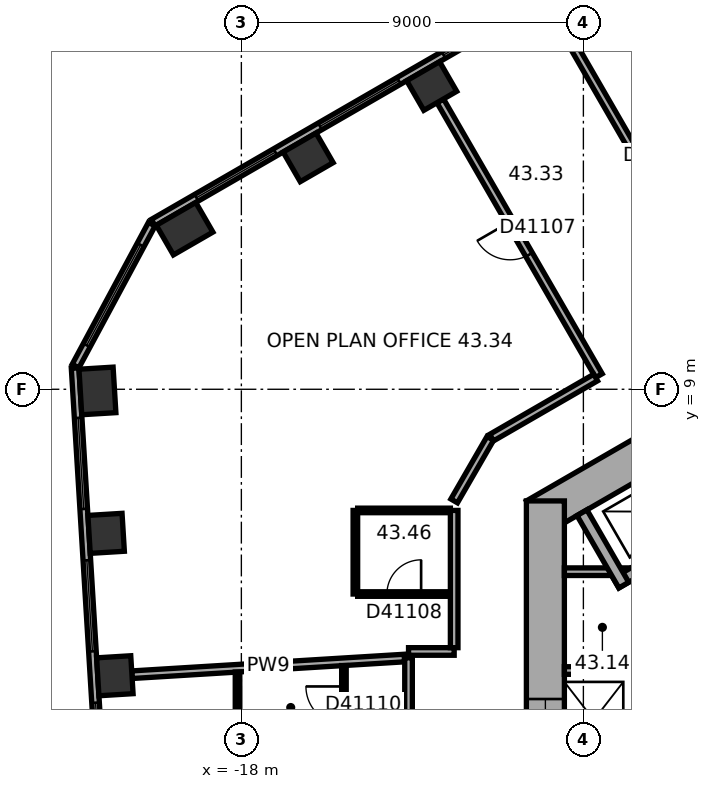
"""IFC4 building model, lengths in metres.
Left out: names, types, materials, properties, quantities, classifications, styles, units other than length and angle.
Written with IfcOpenShell. Run it as: python <this file> out.ifc"""

import sys

from ifc_helpers import new_model, si_unit, direction, frame, frame_2d, origin, origin_2d, place, context, subcontext, project, spatial, rectangle, extrude, element, fill, save


model = new_model("IFC4")
c1 = context("Model", 3, precision=1e-05, world=origin(), true_north=direction((0.0, 1.0)))
c2 = subcontext(c1, "Body", "Model", "MODEL_VIEW")
j1 = project(units=[si_unit("LENGTHUNIT", "METRE"), si_unit("PLANEANGLEUNIT", "RADIAN")], contexts=[c1])
p1 = place(None, origin())
s1 = spatial("IfcSite", under=j1, at=p1, CompositionType="ELEMENT")
p2 = place(p1, origin())
s2 = spatial("IfcBuilding", under=s1, at=p2, CompositionType="ELEMENT")
p3 = place(p2, frame((0.0, 0.0, 176.2)))
s3 = spatial("IfcBuildingStorey", under=s2, at=p3, CompositionType="ELEMENT", Elevation=176.2)
for number, where, z_axis, x_axis in (
    (1, (-12.991, 16.979, 0.0), (0.0, 0.0, 1.0), (-0.866, -0.5, 0.0)),
    (2, (-16.242, 15.102, 0.0), (0.0, 0.0, 1.0), (-0.866, -0.5, 0.0)),
):
    element("IfcColumn", number, at=place(p3, frame(where, z_axis=z_axis, x_axis=x_axis)), inside=s3, PredefinedType="COLUMN", context=c2, shape_type="SweptSolid", body=[
        extrude(rectangle(XDim=1.0, YDim=0.9, at=origin_2d()), origin(), (0.0, 0.0, 1.0), 3.7),
    ])
for number, where, z_axis, x_axis in (
    (3, (-19.494, 13.225, 0.0), (0.0, 0.0, 1.0), (-0.866, -0.5, 0.0)),
    (4, (-21.787, 8.956, 0.0), (0.0, 0.0, 1.0), (0.061, -0.998, 0.0)),
):
    element("IfcColumn", number, at=place(p3, frame(where, z_axis=z_axis, x_axis=x_axis)), inside=s3, PredefinedType="COLUMN", context=c2, shape_type="SweptSolid", body=[
        extrude(rectangle(XDim=1.2, YDim=0.9, at=origin_2d()), origin(), (0.0, 0.0, 1.0), 3.7),
    ])
for number, where, z_axis, x_axis in (
    (5, (-21.558, 5.209, 0.0), (0.0, 0.0, 1.0), (0.061, -0.998, 0.0)),
    (6, (-21.329, 1.462, 0.0), (0.0, 0.0, 1.0), (0.061, -0.998, 0.0)),
):
    element("IfcColumn", number, at=place(p3, frame(where, z_axis=z_axis, x_axis=x_axis)), inside=s3, PredefinedType="COLUMN", context=c2, shape_type="SweptSolid", body=[
        extrude(rectangle(XDim=1.0, YDim=0.9, at=origin_2d()), origin(), (0.0, 0.0, 1.0), 3.7),
    ])
p4 = place(p3, frame((0.25, 11.691, 0.0), z_axis=(0.0, 0.0, 1.0), x_axis=(-0.866022616891, -0.50000482701, 0.0)))
e7 = element("IfcWall", 7, at=p4, inside=s3, PredefinedType="SHEAR", context=c2, shape_type="SweptSolid", body=[
    extrude(rectangle(XDim=12.125, YDim=1.0, at=frame_2d((6.062, 0.0))), origin(), (0.0, 0.0, 1.0), 3.7),
])
p5 = place(p4, frame((6.262, 0.0, 0.0)))
e8 = element("IfcOpeningElement", 8, at=p5, cuts=e7, PredefinedType="OPENING", context=c2, shape_type="SweptSolid", body=[
    extrude(rectangle(XDim=1.5, YDim=2.1, at=frame_2d((0.75, 1.05))), frame((0.0, 0.51, 0.0), z_axis=(0.0, -1.0, 0.0), x_axis=(1.0, 0.0, 0.0)), (0.0, 0.0, 1.0), 1.02),
])
p6 = place(p4, frame((3.112, 0.0, 0.0)))
e9 = element("IfcOpeningElement", 9, at=p6, cuts=e7, PredefinedType="OPENING", context=c2, shape_type="SweptSolid", body=[
    extrude(rectangle(XDim=0.9, YDim=2.1, at=frame_2d((0.45, 1.05))), frame((0.0, 0.51, 0.0), z_axis=(0.0, -1.0, 0.0), x_axis=(1.0, 0.0, 0.0)), (0.0, 0.0, 1.0), 1.02),
])
p7 = place(p3, frame((-10.0, 6.062, 0.0), z_axis=(0.0, 0.0, 1.0), x_axis=(0.0, -1.0, 0.0)))
e10 = element("IfcWall", 10, at=p7, inside=s3, PredefinedType="SHEAR", context=c2, shape_type="SweptSolid", body=[
    extrude(rectangle(XDim=12.125, YDim=1.0, at=frame_2d((6.062, 0.0))), origin(), (0.0, 0.0, 1.0), 3.7),
])
p8 = place(p7, frame((5.212, 0.0, 0.0)))
e11 = element("IfcOpeningElement", 11, at=p8, cuts=e10, PredefinedType="OPENING", context=c2, shape_type="SweptSolid", body=[
    extrude(rectangle(XDim=1.1, YDim=2.1, at=frame_2d((0.55, 1.05))), frame((0.0, 0.51, 0.0), z_axis=(0.0, -1.0, 0.0), x_axis=(1.0, 0.0, 0.0)), (0.0, 0.0, 1.0), 1.02),
])
p9 = place(p7, frame((7.812, 0.0, 0.0)))
e12 = element("IfcOpeningElement", 12, at=p9, cuts=e10, PredefinedType="OPENING", context=c2, shape_type="SweptSolid", body=[
    extrude(rectangle(XDim=1.1, YDim=2.1, at=frame_2d((0.55, 1.05))), frame((0.0, 0.51, 0.0), z_axis=(0.0, -1.0, 0.0), x_axis=(1.0, 0.0, 0.0)), (0.0, 0.0, 1.0), 1.02),
])
p10 = place(p3, frame((-2.961, 23.405, 0.0), z_axis=(0.0, 0.0, 1.0), x_axis=(-0.866023315909, -0.500003616288, 0.0)))
e13 = element("IfcWall", 13, at=p10, inside=s3, PredefinedType="STANDARD", context=c2, shape_type="SweptSolid", body=[
    extrude(rectangle(XDim=20.044, YDim=0.2, at=frame_2d((10.022, 0.0))), origin(), (0.0, 0.0, 1.0), 3.7),
])
p11 = place(p10, frame((1.314, 0.0, 0.9)))
e14 = element("IfcOpeningElement", 14, at=p11, cuts=e13, PredefinedType="OPENING", context=c2, shape_type="SweptSolid", body=[
    extrude(rectangle(XDim=2.4, YDim=2.0, at=frame_2d((1.2, 1.0))), frame((0.0, 0.11, 0.0), z_axis=(0.0, -1.0, 0.0), x_axis=(1.0, 0.0, 0.0)), (0.0, 0.0, 1.0), 0.22),
])
p12 = place(p10, frame((5.069, 0.0, 0.9)))
e15 = element("IfcOpeningElement", 15, at=p12, cuts=e13, PredefinedType="OPENING", context=c2, shape_type="SweptSolid", body=[
    extrude(rectangle(XDim=2.4, YDim=2.0, at=frame_2d((1.2, 1.0))), frame((0.0, 0.11, 0.0), z_axis=(0.0, -1.0, 0.0), x_axis=(1.0, 0.0, 0.0)), (0.0, 0.0, 1.0), 0.22),
])
p13 = place(p10, frame((8.823, 0.0, 0.9)))
e16 = element("IfcOpeningElement", 16, at=p13, cuts=e13, PredefinedType="OPENING", context=c2, shape_type="SweptSolid", body=[
    extrude(rectangle(XDim=2.4, YDim=2.0, at=frame_2d((1.2, 1.0))), frame((0.0, 0.11, 0.0), z_axis=(0.0, -1.0, 0.0), x_axis=(1.0, 0.0, 0.0)), (0.0, 0.0, 1.0), 0.22),
])
p14 = place(p10, frame((12.577, 0.0, 0.9)))
e17 = element("IfcOpeningElement", 17, at=p14, cuts=e13, PredefinedType="OPENING", context=c2, shape_type="SweptSolid", body=[
    extrude(rectangle(XDim=2.4, YDim=2.0, at=frame_2d((1.2, 1.0))), frame((0.0, 0.11, 0.0), z_axis=(0.0, -1.0, 0.0), x_axis=(1.0, 0.0, 0.0)), (0.0, 0.0, 1.0), 0.22),
])
p15 = place(p10, frame((16.331, 0.0, 0.9)))
e18 = element("IfcOpeningElement", 18, at=p15, cuts=e13, PredefinedType="OPENING", context=c2, shape_type="SweptSolid", body=[
    extrude(rectangle(XDim=2.4, YDim=2.0, at=frame_2d((1.2, 1.0))), frame((0.0, 0.11, 0.0), z_axis=(0.0, -1.0, 0.0), x_axis=(1.0, 0.0, 0.0)), (0.0, 0.0, 1.0), 0.22),
])
p16 = place(p3, frame((-20.357, 13.344, 0.0), z_axis=(0.0, 0.0, 1.0), x_axis=(-0.473288913494, -0.880907262068, 0.0)))
e19 = element("IfcWall", 19, at=p16, inside=s3, PredefinedType="STANDARD", context=c2, shape_type="SweptSolid", body=[
    extrude(rectangle(XDim=4.238, YDim=0.2, at=frame_2d((2.119, 0.0))), origin(), (0.0, 0.0, 1.0), 3.7),
])
p17 = place(p16, frame((0.619, 0.0, 0.9)))
e20 = element("IfcOpeningElement", 20, at=p17, cuts=e19, PredefinedType="OPENING", context=c2, shape_type="SweptSolid", body=[
    extrude(rectangle(XDim=3.0, YDim=2.0, at=frame_2d((1.5, 1.0))), frame((0.0, 0.11, 0.0), z_axis=(0.0, -1.0, 0.0), x_axis=(1.0, 0.0, 0.0)), (0.0, 0.0, 1.0), 0.22),
])
p18 = place(p3, frame((-22.375, 9.557, 0.0), z_axis=(0.0, 0.0, 1.0), x_axis=(0.061036015339, -0.998135564356, 0.0)))
e21 = element("IfcWall", 21, at=p18, inside=s3, PredefinedType="STANDARD", context=c2, shape_type="SweptSolid", body=[
    extrude(rectangle(XDim=20.044, YDim=0.2, at=frame_2d((10.022, 0.0))), origin(), (0.0, 0.0, 1.0), 3.7),
])
p19 = place(p18, frame((1.313, 0.0, 0.9)))
e22 = element("IfcOpeningElement", 22, at=p19, cuts=e21, PredefinedType="OPENING", context=c2, shape_type="SweptSolid", body=[
    extrude(rectangle(XDim=2.4, YDim=2.0, at=frame_2d((1.2, 1.0))), frame((0.0, 0.11, 0.0), z_axis=(0.0, -1.0, 0.0), x_axis=(1.0, 0.0, 0.0)), (0.0, 0.0, 1.0), 0.22),
])
p20 = place(p18, frame((5.067, 0.0, 0.9)))
e23 = element("IfcOpeningElement", 23, at=p20, cuts=e21, PredefinedType="OPENING", context=c2, shape_type="SweptSolid", body=[
    extrude(rectangle(XDim=2.4, YDim=2.0, at=frame_2d((1.2, 1.0))), frame((0.0, 0.11, 0.0), z_axis=(0.0, -1.0, 0.0), x_axis=(1.0, 0.0, 0.0)), (0.0, 0.0, 1.0), 0.22),
])
p21 = place(p18, frame((8.821, 0.0, 0.9)))
e24 = element("IfcOpeningElement", 24, at=p21, cuts=e21, PredefinedType="OPENING", context=c2, shape_type="SweptSolid", body=[
    extrude(rectangle(XDim=2.4, YDim=2.0, at=frame_2d((1.2, 1.0))), frame((0.0, 0.11, 0.0), z_axis=(0.0, -1.0, 0.0), x_axis=(1.0, 0.0, 0.0)), (0.0, 0.0, 1.0), 0.22),
])
p22 = place(p18, frame((12.575, 0.0, 0.9)))
e25 = element("IfcOpeningElement", 25, at=p22, cuts=e21, PredefinedType="OPENING", context=c2, shape_type="SweptSolid", body=[
    extrude(rectangle(XDim=2.4, YDim=2.0, at=frame_2d((1.2, 1.0))), frame((0.0, 0.11, 0.0), z_axis=(0.0, -1.0, 0.0), x_axis=(1.0, 0.0, 0.0)), (0.0, 0.0, 1.0), 0.22),
])
p23 = place(p18, frame((16.329, 0.0, 0.9)))
e26 = element("IfcOpeningElement", 26, at=p23, cuts=e21, PredefinedType="OPENING", context=c2, shape_type="SweptSolid", body=[
    extrude(rectangle(XDim=2.4, YDim=2.0, at=frame_2d((1.2, 1.0))), frame((0.0, 0.11, 0.0), z_axis=(0.0, -1.0, 0.0), x_axis=(1.0, 0.0, 0.0)), (0.0, 0.0, 1.0), 0.22),
])
for number, where, z_axis, x_axis in (
    (27, (-7.3, 4.2, 0.0), (0.0, 0.0, 1.0), (-1.0, 0.0, 0.0)),
    (28, (-7.3, 1.6, 0.0), (0.0, 0.0, 1.0), (-1.0, 0.0, 0.0)),
):
    element("IfcWall", number, at=place(p3, frame(where, z_axis=z_axis, x_axis=x_axis)), inside=s3, PredefinedType="PARTITIONING", context=c2, shape_type="SweptSolid", body=[
        extrude(rectangle(XDim=2.2, YDim=0.2, at=frame_2d((1.1, 0.0))), origin(), (0.0, 0.0, 1.0), 3.42),
    ])
p24 = place(p3, frame((-5.24, 5.577, 0.0), z_axis=(0.0, 0.0, 1.0), x_axis=(-0.866014461049, -0.500018952895, 0.0)))
e29 = element("IfcWall", 29, at=p24, inside=s3, PredefinedType="SHEAR", context=c2, shape_type="SweptSolid", body=[
    extrude(rectangle(XDim=3.35, YDim=0.3, at=frame_2d((1.675, 0.0))), origin(), (0.0, 0.0, 1.0), 3.42),
])
p25 = place(p3, frame((-7.937, 3.847, 0.0), z_axis=(0.0, 0.0, 1.0), x_axis=(-0.50002983664, 0.866008176907, 0.0)))
e30 = element("IfcWall", 30, at=p25, inside=s3, PredefinedType="SHEAR", context=c2, shape_type="SweptSolid", body=[
    extrude(rectangle(XDim=2.2, YDim=0.3, at=frame_2d((1.1, 0.0))), origin(), (0.0, 0.0, 1.0), 3.42),
])
p26 = place(p3, frame((-20.88, 1.49, 0.0), z_axis=(0.0, 0.0, 1.0), x_axis=(0.998134881975, 0.061047173439, 0.0)))
e31 = element("IfcWall", 31, at=p26, inside=s3, PredefinedType="PARTITIONING", context=c2, shape_type="SweptSolid", body=[
    extrude(rectangle(XDim=7.183, YDim=0.2, at=frame_2d((3.591, 0.0))), origin(), (0.0, 0.0, 1.0), 2.87),
])
p27 = place(p3, frame((-18.101, 1.559, 0.0), z_axis=(0.0, 0.0, 1.0), x_axis=(0.0, -1.0, 0.0)))
e32 = element("IfcWall", 32, at=p27, inside=s3, PredefinedType="PARTITIONING", context=c2, shape_type="SweptSolid", body=[
    extrude(rectangle(XDim=1.869, YDim=0.12, at=frame_2d((0.934, 0.0))), origin(), (0.0, 0.0, 1.0), 3.42),
])
p28 = place(p3, frame((-15.301, 1.731, 0.0), z_axis=(0.0, 0.0, 1.0), x_axis=(0.0, -1.0, 0.0)))
e33 = element("IfcWall", 33, at=p28, inside=s3, PredefinedType="PARTITIONING", context=c2, shape_type="SweptSolid", body=[
    extrude(rectangle(XDim=7.322, YDim=0.12, at=frame_2d((3.661, 0.0))), origin(), (0.0, 0.0, 1.0), 3.42),
])
p29 = place(p28, frame((0.55, 0.0, 0.0)))
e34 = element("IfcOpeningElement", 34, at=p29, cuts=e33, PredefinedType="OPENING", context=c2, shape_type="SweptSolid", body=[
    extrude(rectangle(XDim=1.0, YDim=2.1, at=frame_2d((0.5, 1.05))), frame((0.0, 0.07, 0.0), z_axis=(0.0, -1.0, 0.0), x_axis=(1.0, 0.0, 0.0)), (0.0, 0.0, 1.0), 0.14),
])
p30 = place(p28, frame((2.736, 0.0, 0.0)))
e35 = element("IfcOpeningElement", 35, at=p30, cuts=e33, PredefinedType="OPENING", context=c2, shape_type="SweptSolid", body=[
    extrude(rectangle(XDim=0.9, YDim=2.1, at=frame_2d((0.45, 1.05))), frame((0.0, 0.07, 0.0), z_axis=(0.0, -1.0, 0.0), x_axis=(1.0, 0.0, 0.0)), (0.0, 0.0, 1.0), 0.14),
])
p31 = place(p28, frame((5.347, 0.0, 0.0)))
e36 = element("IfcOpeningElement", 36, at=p31, cuts=e33, PredefinedType="OPENING", context=c2, shape_type="SweptSolid", body=[
    extrude(rectangle(XDim=0.9, YDim=2.1, at=frame_2d((0.45, 1.05))), frame((0.0, 0.07, 0.0), z_axis=(0.0, -1.0, 0.0), x_axis=(1.0, 0.0, 0.0)), (0.0, 0.0, 1.0), 0.14),
])
p32 = place(p3, frame((-15.0, 3.612, 0.0), z_axis=(0.0, 0.0, 1.0), x_axis=(0.0, 1.0, 0.0)))
e37 = element("IfcWall", 37, at=p32, inside=s3, PredefinedType="PARTITIONING", context=c2, shape_type="SweptSolid", body=[
    extrude(rectangle(XDim=2.2, YDim=0.12, at=frame_2d((1.1, 0.0))), origin(), (0.0, 0.0, 1.0), 3.42),
])
p33 = place(p3, frame((-14.94, 5.812, 0.0), z_axis=(0.0, 0.0, 1.0), x_axis=(1.0, 0.0, 0.0)))
e38 = element("IfcWall", 38, at=p33, inside=s3, PredefinedType="PARTITIONING", context=c2, shape_type="SweptSolid", body=[
    extrude(rectangle(XDim=2.44, YDim=0.12, at=frame_2d((1.22, 0.0))), origin(), (0.0, 0.0, 1.0), 3.42),
])
p34 = place(p3, frame((-13.601, 1.935, 0.0), z_axis=(0.0, 0.0, 1.0), x_axis=(0.0, -1.0, 0.0)))
e39 = element("IfcWall", 39, at=p34, inside=s3, PredefinedType="PARTITIONING", context=c2, shape_type="SweptSolid", body=[
    extrude(rectangle(XDim=5.936, YDim=0.2, at=frame_2d((2.968, 0.0))), origin(), (0.0, 0.0, 1.0), 3.42),
])
p35 = place(p34, frame((2.468, 0.0, 0.0)))
e40 = element("IfcOpeningElement", 40, at=p35, cuts=e39, PredefinedType="OPENING", context=c2, shape_type="SweptSolid", body=[
    extrude(rectangle(XDim=1.0, YDim=2.1, at=frame_2d((0.5, 1.05))), frame((0.0, 0.11, 0.0), z_axis=(0.0, -1.0, 0.0), x_axis=(1.0, 0.0, 0.0)), (0.0, 0.0, 1.0), 0.22),
])
p36 = place(p3, frame((-12.766, 16.589, 0.0), z_axis=(0.0, 0.0, 1.0), x_axis=(0.500010139422, -0.866019549707, 0.0)))
e41 = element("IfcWall", 41, at=p36, inside=s3, PredefinedType="PARTITIONING", context=c2, shape_type="SweptSolid", body=[
    extrude(rectangle(XDim=8.35, YDim=0.2, at=frame_2d((4.175, 0.0))), origin(), (0.0, 0.0, 1.0), 3.42),
])
p37 = place(p36, frame((3.675, 0.0, 0.0)))
e42 = element("IfcOpeningElement", 42, at=p37, cuts=e41, PredefinedType="OPENING", context=c2, shape_type="SweptSolid", body=[
    extrude(rectangle(XDim=1.0, YDim=2.1, at=frame_2d((0.5, 1.05))), frame((0.0, 0.11, 0.0), z_axis=(0.0, -1.0, 0.0), x_axis=(1.0, 0.0, 0.0)), (0.0, 0.0, 1.0), 0.22),
])
p38 = place(p3, frame((-12.5, 3.612, 0.0), z_axis=(0.0, 0.0, 1.0), x_axis=(-1.0, 0.0, 0.0)))
e43 = element("IfcWall", 43, at=p38, inside=s3, PredefinedType="PARTITIONING", context=c2, shape_type="SweptSolid", body=[
    extrude(rectangle(XDim=2.44, YDim=0.12, at=frame_2d((1.22, 0.0))), origin(), (0.0, 0.0, 1.0), 3.42),
])
p39 = place(p38, frame((0.77, 0.0, 0.0)))
e44 = element("IfcOpeningElement", 44, at=p39, cuts=e43, PredefinedType="OPENING", context=c2, shape_type="SweptSolid", body=[
    extrude(rectangle(XDim=0.9, YDim=2.1, at=frame_2d((0.45, 1.05))), frame((0.0, 0.07, 0.0), z_axis=(0.0, -1.0, 0.0), x_axis=(1.0, 0.0, 0.0)), (0.0, 0.0, 1.0), 0.14),
])
p40 = place(p3, frame((-12.4, 2.101, 0.0), z_axis=(0.0, 0.0, 1.0), x_axis=(-1.0, 0.0, 0.0)))
e45 = element("IfcWall", 45, at=p40, inside=s3, PredefinedType="PARTITIONING", context=c2, shape_type="SweptSolid", body=[
    extrude(rectangle(XDim=1.201, YDim=0.2, at=frame_2d((0.601, 0.0))), origin(), (0.0, 0.0, 1.0), 3.42),
])
p41 = place(p3, frame((-12.4, 5.812, 0.0), z_axis=(0.0, 0.0, 1.0), x_axis=(0.0, -1.0, 0.0)))
e46 = element("IfcWall", 46, at=p41, inside=s3, PredefinedType="PARTITIONING", context=c2, shape_type="SweptSolid", body=[
    extrude(rectangle(XDim=3.611, YDim=0.2, at=frame_2d((1.806, 0.0))), origin(), (0.0, 0.0, 1.0), 3.42),
])
p42 = place(p3, frame((-11.45, 7.708, 0.0), z_axis=(0.0, 0.0, 1.0), x_axis=(-0.500022797313, -0.86601224135, 0.0)))
e47 = element("IfcWall", 47, at=p42, inside=s3, PredefinedType="PARTITIONING", context=c2, shape_type="SweptSolid", body=[
    extrude(rectangle(XDim=1.9, YDim=0.2, at=frame_2d((0.95, 0.0))), origin(), (0.0, 0.0, 1.0), 3.42),
])
p43 = place(p3, frame((-9.515, 18.466, 0.0), z_axis=(0.0, 0.0, 1.0), x_axis=(0.500010139422, -0.866019549707, 0.0)))
e48 = element("IfcWall", 48, at=p43, inside=s3, PredefinedType="PARTITIONING", context=c2, shape_type="SweptSolid", body=[
    extrude(rectangle(XDim=8.35, YDim=0.2, at=frame_2d((4.175, 0.0))), origin(), (0.0, 0.0, 1.0), 2.87),
])
p44 = place(p43, frame((3.675, 0.0, 0.0)))
e49 = element("IfcOpeningElement", 49, at=p44, cuts=e48, PredefinedType="OPENING", context=c2, shape_type="SweptSolid", body=[
    extrude(rectangle(XDim=1.0, YDim=2.1, at=frame_2d((0.5, 1.05))), frame((0.0, 0.11, 0.0), z_axis=(0.0, -1.0, 0.0), x_axis=(1.0, 0.0, 0.0)), (0.0, 0.0, 1.0), 0.22),
])
p45 = place(p3, frame((-8.678, 9.308, 0.0), z_axis=(0.0, 0.0, 1.0), x_axis=(-0.866000359435, -0.500043375578, 0.0)))
e50 = element("IfcWall", 50, at=p45, inside=s3, PredefinedType="PARTITIONING", context=c2, shape_type="SweptSolid", body=[
    extrude(rectangle(XDim=3.161, YDim=0.2, at=frame_2d((1.581, 0.0))), origin(), (0.0, 0.0, 1.0), 3.42),
])
p46 = place(p13, origin())
e51 = element("IfcWindow", 51, at=p46, inside=s3, PartitioningType="SINGLE_PANEL", PredefinedType="WINDOW", context=c2, shape_type="SweptSolid", body=[
    extrude(rectangle(XDim=2.4, YDim=2.0, at=frame_2d((1.2, 1.0))), frame((0.0, 0.03, 0.0), z_axis=(0.0, -1.0, 0.0), x_axis=(1.0, 0.0, 0.0)), (0.0, 0.0, 1.0), 0.06),
])
fill(e16, e51)
p47 = place(p14, origin())
e52 = element("IfcWindow", 52, at=p47, inside=s3, PartitioningType="SINGLE_PANEL", PredefinedType="WINDOW", context=c2, shape_type="SweptSolid", body=[
    extrude(rectangle(XDim=2.4, YDim=2.0, at=frame_2d((1.2, 1.0))), frame((0.0, 0.03, 0.0), z_axis=(0.0, -1.0, 0.0), x_axis=(1.0, 0.0, 0.0)), (0.0, 0.0, 1.0), 0.06),
])
fill(e17, e52)
p48 = place(p15, origin())
e53 = element("IfcWindow", 53, at=p48, inside=s3, PartitioningType="SINGLE_PANEL", PredefinedType="WINDOW", context=c2, shape_type="SweptSolid", body=[
    extrude(rectangle(XDim=2.4, YDim=2.0, at=frame_2d((1.2, 1.0))), frame((0.0, 0.03, 0.0), z_axis=(0.0, -1.0, 0.0), x_axis=(1.0, 0.0, 0.0)), (0.0, 0.0, 1.0), 0.06),
])
fill(e18, e53)
p49 = place(p17, origin())
e54 = element("IfcWindow", 54, at=p49, inside=s3, PartitioningType="SINGLE_PANEL", PredefinedType="WINDOW", context=c2, shape_type="SweptSolid", body=[
    extrude(rectangle(XDim=3.0, YDim=2.0, at=frame_2d((1.5, 1.0))), frame((0.0, 0.03, 0.0), z_axis=(0.0, -1.0, 0.0), x_axis=(1.0, 0.0, 0.0)), (0.0, 0.0, 1.0), 0.06),
])
fill(e20, e54)
p50 = place(p19, origin())
e55 = element("IfcWindow", 55, at=p50, inside=s3, PartitioningType="SINGLE_PANEL", PredefinedType="WINDOW", context=c2, shape_type="SweptSolid", body=[
    extrude(rectangle(XDim=2.4, YDim=2.0, at=frame_2d((1.2, 1.0))), frame((0.0, 0.03, 0.0), z_axis=(0.0, -1.0, 0.0), x_axis=(1.0, 0.0, 0.0)), (0.0, 0.0, 1.0), 0.06),
])
fill(e22, e55)
p51 = place(p20, origin())
e56 = element("IfcWindow", 56, at=p51, inside=s3, PartitioningType="SINGLE_PANEL", PredefinedType="WINDOW", context=c2, shape_type="SweptSolid", body=[
    extrude(rectangle(XDim=2.4, YDim=2.0, at=frame_2d((1.2, 1.0))), frame((0.0, 0.03, 0.0), z_axis=(0.0, -1.0, 0.0), x_axis=(1.0, 0.0, 0.0)), (0.0, 0.0, 1.0), 0.06),
])
fill(e23, e56)
p52 = place(p21, origin())
e57 = element("IfcWindow", 57, at=p52, inside=s3, PartitioningType="SINGLE_PANEL", PredefinedType="WINDOW", context=c2, shape_type="SweptSolid", body=[
    extrude(rectangle(XDim=2.4, YDim=2.0, at=frame_2d((1.2, 1.0))), frame((0.0, 0.03, 0.0), z_axis=(0.0, -1.0, 0.0), x_axis=(1.0, 0.0, 0.0)), (0.0, 0.0, 1.0), 0.06),
])
fill(e24, e57)
p53 = place(p8, origin())
e58 = element("IfcDoor", 58, at=p53, inside=s3, OperationType="DOUBLE_DOOR_SLIDING", PredefinedType="DOOR", context=c2, shape_type="SweptSolid", body=[
    extrude(rectangle(XDim=1.1, YDim=2.1, at=frame_2d((0.55, 1.05))), frame((0.0, 0.025, 0.0), z_axis=(0.0, -1.0, 0.0), x_axis=(1.0, 0.0, 0.0)), (0.0, 0.0, 1.0), 0.05),
])
fill(e11, e58)
p54 = place(p37, origin())
e59 = element("IfcDoor", 59, at=p54, inside=s3, OperationType="SINGLE_SWING_LEFT", PredefinedType="DOOR", context=c2, shape_type="SweptSolid", body=[
    extrude(rectangle(XDim=1.0, YDim=2.1, at=frame_2d((0.5, 1.05))), frame((0.0, 0.025, 0.0), z_axis=(0.0, -1.0, 0.0), x_axis=(1.0, 0.0, 0.0)), (0.0, 0.0, 1.0), 0.05),
])
fill(e42, e59)
p55 = place(p39, origin())
e60 = element("IfcDoor", 60, at=p55, inside=s3, OperationType="SINGLE_SWING_LEFT", PredefinedType="DOOR", context=c2, shape_type="SweptSolid", body=[
    extrude(rectangle(XDim=0.9, YDim=2.1, at=frame_2d((0.45, 1.05))), frame((0.0, 0.025, 0.0), z_axis=(0.0, -1.0, 0.0), x_axis=(1.0, 0.0, 0.0)), (0.0, 0.0, 1.0), 0.05),
])
fill(e44, e60)
p56 = place(p29, origin())
e61 = element("IfcDoor", 61, at=p56, inside=s3, OperationType="SINGLE_SWING_LEFT", PredefinedType="DOOR", context=c2, shape_type="SweptSolid", body=[
    extrude(rectangle(XDim=1.0, YDim=2.1, at=frame_2d((0.5, 1.05))), frame((0.0, 0.025, 0.0), z_axis=(0.0, -1.0, 0.0), x_axis=(1.0, 0.0, 0.0)), (0.0, 0.0, 1.0), 0.05),
])
fill(e34, e61)
save(model, sys.argv[1])
